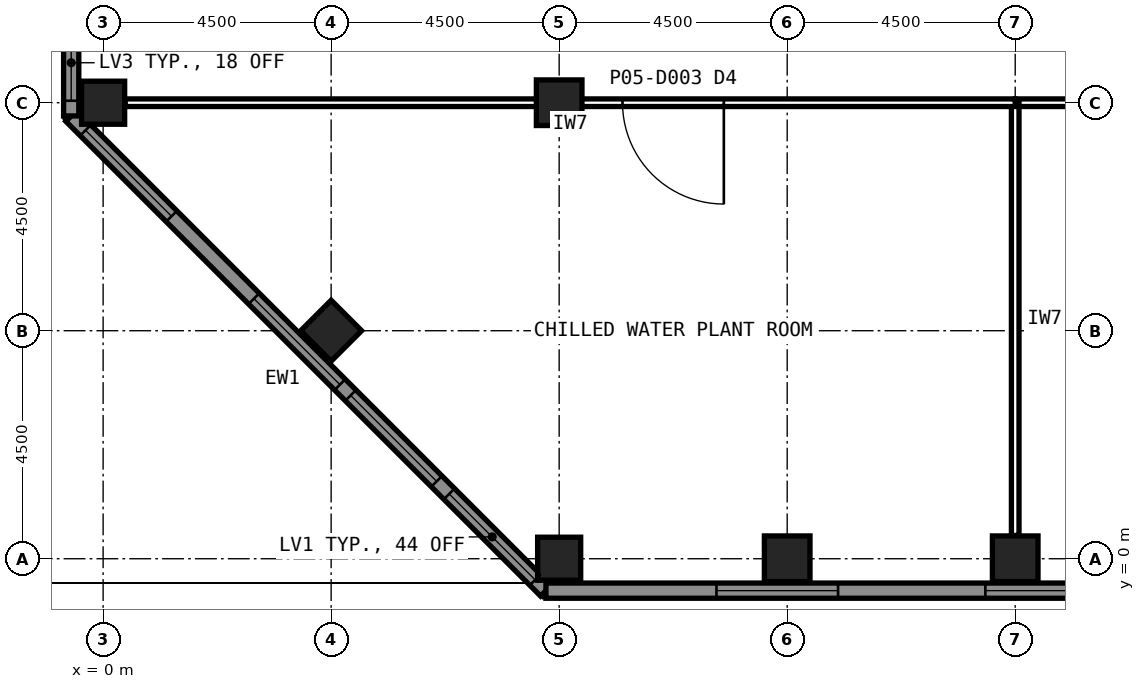
"""IFC4 building model, lengths in metres.
Left out: names, types, materials, properties, quantities, classifications, styles, units other than length and angle.
Written with IfcOpenShell. Run it as: python <this file> out.ifc"""

import sys

from ifc_helpers import new_model, si_unit, direction, frame, frame_2d, origin, origin_2d, place, context, subcontext, project, spatial, rectangle, hollow_rectangle, extrude, element, fill, save


model = new_model("IFC4")
c1 = context("Model", 3, precision=1e-05, world=origin(), true_north=direction((0.0, 1.0)))
c2 = subcontext(c1, "Body", "Model", "MODEL_VIEW")
j1 = project(units=[si_unit("LENGTHUNIT", "METRE"), si_unit("PLANEANGLEUNIT", "RADIAN")], contexts=[c1])
p1 = place(None, origin())
s1 = spatial("IfcSite", under=j1, at=p1, CompositionType="ELEMENT")
p2 = place(p1, origin())
s2 = spatial("IfcBuilding", under=s1, at=p2, CompositionType="ELEMENT")
p3 = place(p2, frame((0.0, 0.0, 23.0)))
s3 = spatial("IfcBuildingStorey", under=s2, at=p3, CompositionType="ELEMENT", Elevation=23.0)
p4 = place(p3, frame((9.0, 0.0, 0.0), z_axis=(0.0, 0.0, 1.0), x_axis=(1.0, 0.0, 0.0)))
e1 = element("IfcColumn", 1, at=p4, inside=s3, PredefinedType="COLUMN", context=c2, shape_type="SweptSolid", body=[
    extrude(hollow_rectangle(XDim=0.85, YDim=0.85, WallThickness=0.05, at=origin_2d()), origin(), (0.0, 0.0, 1.0), 6.0),
])
for number, where, z_axis, x_axis in (
    (2, (13.5, 0.0, 0.0), (0.0, 0.0, 1.0), (1.0, 0.0, 0.0)),
    (3, (18.0, 0.0, 0.0), (0.0, 0.0, 1.0), (1.0, 0.0, 0.0)),
):
    element("IfcColumn", number, at=place(p3, frame(where, z_axis=z_axis, x_axis=x_axis)), inside=s3, PredefinedType="COLUMN", context=c2, shape_type="SweptSolid", body=[
        extrude(hollow_rectangle(XDim=0.9, YDim=0.9, WallThickness=0.063, at=origin_2d()), origin(), (0.0, 0.0, 1.0), 6.0),
    ])
for number, where, z_axis, x_axis in (
    (4, (0.0, 9.0, 0.0), (0.0, 0.0, 1.0), (1.0, 0.0, 0.0)),
    (5, (4.5, 4.5, 0.0), (0.0, 0.0, 1.0), (0.707, 0.707, 0.0)),
):
    element("IfcColumn", number, at=place(p3, frame(where, z_axis=z_axis, x_axis=x_axis)), inside=s3, PredefinedType="COLUMN", context=c2, shape_type="SweptSolid", body=[
        extrude(hollow_rectangle(XDim=0.85, YDim=0.85, WallThickness=0.05, at=origin_2d()), origin(), (0.0, 0.0, 1.0), 6.0),
    ])
p5 = place(p3, frame((9.0, 9.0, 0.0), z_axis=(0.0, 0.0, 1.0), x_axis=(1.0, 0.0, 0.0)))
e6 = element("IfcColumn", 6, at=p5, inside=s3, PredefinedType="COLUMN", context=c2, shape_type="SweptSolid", body=[
    extrude(hollow_rectangle(XDim=0.9, YDim=0.9, WallThickness=0.063, at=origin_2d()), origin(), (0.0, 0.0, 1.0), 6.0),
])
p6 = place(p3, frame((8.739, -0.63, 0.0), z_axis=(0.0, 0.0, 1.0), x_axis=(-0.707106781187, 0.707106781187, 0.0)))
e7 = element("IfcWall", 7, at=p6, inside=s3, PredefinedType="SOLIDWALL", context=c2, shape_type="SweptSolid", body=[
    extrude(rectangle(XDim=13.25, YDim=0.3, at=frame_2d((6.625, 0.0))), origin(), (0.0, 0.0, 1.0), 6.0),
])
p7 = place(p6, frame((0.3, 0.0, 0.3)))
e8 = element("IfcOpeningElement", 8, at=p7, cuts=e7, PredefinedType="OPENING", context=c2, shape_type="SweptSolid", body=[
    extrude(rectangle(XDim=2.4, YDim=3.0, at=frame_2d((1.2, 1.5))), frame((0.0, 0.16, 0.0), z_axis=(0.0, -1.0, 0.0), x_axis=(1.0, 0.0, 0.0)), (0.0, 0.0, 1.0), 0.32),
])
p8 = place(p6, frame((3.05, 0.0, 2.7)))
e9 = element("IfcOpeningElement", 9, at=p8, cuts=e7, PredefinedType="OPENING", context=c2, shape_type="SweptSolid", body=[
    extrude(rectangle(XDim=2.4, YDim=3.0, at=frame_2d((1.2, 1.5))), frame((0.0, 0.16, 0.0), z_axis=(0.0, -1.0, 0.0), x_axis=(1.0, 0.0, 0.0)), (0.0, 0.0, 1.0), 0.32),
])
p9 = place(p6, frame((5.75, 0.0, 0.75)))
e10 = element("IfcOpeningElement", 10, at=p9, cuts=e7, PredefinedType="OPENING", context=c2, shape_type="SweptSolid", body=[
    extrude(rectangle(XDim=2.4, YDim=3.0, at=frame_2d((1.2, 1.5))), frame((0.0, 0.16, 0.0), z_axis=(0.0, -1.0, 0.0), x_axis=(1.0, 0.0, 0.0)), (0.0, 0.0, 1.0), 0.32),
])
p10 = place(p6, frame((10.45, 0.0, 0.3)))
e11 = element("IfcOpeningElement", 11, at=p10, cuts=e7, PredefinedType="OPENING", context=c2, shape_type="SweptSolid", body=[
    extrude(rectangle(XDim=2.4, YDim=3.0, at=frame_2d((1.2, 1.5))), frame((0.0, 0.16, 0.0), z_axis=(0.0, -1.0, 0.0), x_axis=(1.0, 0.0, 0.0)), (0.0, 0.0, 1.0), 0.32),
])
p11 = place(p3, frame((-0.63, 8.739, 0.0), z_axis=(0.0, 0.0, 1.0), x_axis=(0.0, 1.0, 0.0)))
e12 = element("IfcWall", 12, at=p11, inside=s3, PredefinedType="SOLIDWALL", context=c2, shape_type="SweptSolid", body=[
    extrude(rectangle(XDim=36.522, YDim=0.3, at=frame_2d((18.261, 0.0))), origin(), (0.0, 0.0, 1.0), 6.0),
])
p12 = place(p11, frame((16.011, 0.0, 0.0)))
e13 = element("IfcOpeningElement", 13, at=p12, cuts=e12, PredefinedType="OPENING", context=c2, shape_type="SweptSolid", body=[
    extrude(rectangle(XDim=1.0, YDim=2.1, at=frame_2d((0.5, 1.05))), frame((0.0, 0.16, 0.0), z_axis=(0.0, -1.0, 0.0), x_axis=(1.0, 0.0, 0.0)), (0.0, 0.0, 1.0), 0.32),
])
p13 = place(p11, frame((0.3, 0.0, 0.3)))
e14 = element("IfcOpeningElement", 14, at=p13, cuts=e12, PredefinedType="OPENING", context=c2, shape_type="SweptSolid", body=[
    extrude(rectangle(XDim=1.5, YDim=2.0, at=frame_2d((0.75, 1.0))), frame((0.0, 0.16, 0.0), z_axis=(0.0, -1.0, 0.0), x_axis=(1.0, 0.0, 0.0)), (0.0, 0.0, 1.0), 0.32),
])
p14 = place(p11, frame((3.365, 0.0, 1.2)))
e15 = element("IfcOpeningElement", 15, at=p14, cuts=e12, PredefinedType="OPENING", context=c2, shape_type="SweptSolid", body=[
    extrude(rectangle(XDim=2.4, YDim=3.0, at=frame_2d((1.2, 1.5))), frame((0.0, 0.16, 0.0), z_axis=(0.0, -1.0, 0.0), x_axis=(1.0, 0.0, 0.0)), (0.0, 0.0, 1.0), 0.32),
])
p15 = place(p11, frame((1.5, 0.0, 3.65)))
e16 = element("IfcOpeningElement", 16, at=p15, cuts=e12, PredefinedType="OPENING", context=c2, shape_type="SweptSolid", body=[
    extrude(rectangle(XDim=1.5, YDim=2.0, at=frame_2d((0.75, 1.0))), frame((0.0, 0.16, 0.0), z_axis=(0.0, -1.0, 0.0), x_axis=(1.0, 0.0, 0.0)), (0.0, 0.0, 1.0), 0.32),
])
p16 = place(p11, frame((6.1, 0.0, 3.6)))
e17 = element("IfcOpeningElement", 17, at=p16, cuts=e12, PredefinedType="OPENING", context=c2, shape_type="SweptSolid", body=[
    extrude(rectangle(XDim=1.5, YDim=2.0, at=frame_2d((0.75, 1.0))), frame((0.0, 0.16, 0.0), z_axis=(0.0, -1.0, 0.0), x_axis=(1.0, 0.0, 0.0)), (0.0, 0.0, 1.0), 0.32),
])
p17 = place(p11, frame((12.496, 0.0, 1.2)))
e18 = element("IfcOpeningElement", 18, at=p17, cuts=e12, PredefinedType="OPENING", context=c2, shape_type="SweptSolid", body=[
    extrude(rectangle(XDim=2.4, YDim=3.0, at=frame_2d((1.2, 1.5))), frame((0.0, 0.16, 0.0), z_axis=(0.0, -1.0, 0.0), x_axis=(1.0, 0.0, 0.0)), (0.0, 0.0, 1.0), 0.32),
])
p18 = place(p11, frame((7.45, 0.0, 0.3)))
e19 = element("IfcOpeningElement", 19, at=p18, cuts=e12, PredefinedType="OPENING", context=c2, shape_type="SweptSolid", body=[
    extrude(rectangle(XDim=2.4, YDim=3.0, at=frame_2d((1.2, 1.5))), frame((0.0, 0.16, 0.0), z_axis=(0.0, -1.0, 0.0), x_axis=(1.0, 0.0, 0.0)), (0.0, 0.0, 1.0), 0.32),
])
p19 = place(p11, frame((21.626, 0.0, 1.2)))
e20 = element("IfcOpeningElement", 20, at=p19, cuts=e12, PredefinedType="OPENING", context=c2, shape_type="SweptSolid", body=[
    extrude(rectangle(XDim=2.4, YDim=3.0, at=frame_2d((1.2, 1.5))), frame((0.0, 0.16, 0.0), z_axis=(0.0, -1.0, 0.0), x_axis=(1.0, 0.0, 0.0)), (0.0, 0.0, 1.0), 0.32),
])
p20 = place(p11, frame((10.15, 0.0, 0.3)))
e21 = element("IfcOpeningElement", 21, at=p20, cuts=e12, PredefinedType="OPENING", context=c2, shape_type="SweptSolid", body=[
    extrude(rectangle(XDim=1.5, YDim=2.0, at=frame_2d((0.75, 1.0))), frame((0.0, 0.16, 0.0), z_axis=(0.0, -1.0, 0.0), x_axis=(1.0, 0.0, 0.0)), (0.0, 0.0, 1.0), 0.32),
])
p21 = place(p11, frame((17.35, 0.0, 0.3)))
e22 = element("IfcOpeningElement", 22, at=p21, cuts=e12, PredefinedType="OPENING", context=c2, shape_type="SweptSolid", body=[
    extrude(rectangle(XDim=2.4, YDim=3.0, at=frame_2d((1.2, 1.5))), frame((0.0, 0.16, 0.0), z_axis=(0.0, -1.0, 0.0), x_axis=(1.0, 0.0, 0.0)), (0.0, 0.0, 1.0), 0.32),
])
p22 = place(p11, frame((30.757, 0.0, 1.2)))
e23 = element("IfcOpeningElement", 23, at=p22, cuts=e12, PredefinedType="OPENING", context=c2, shape_type="SweptSolid", body=[
    extrude(rectangle(XDim=2.4, YDim=3.0, at=frame_2d((1.2, 1.5))), frame((0.0, 0.16, 0.0), z_axis=(0.0, -1.0, 0.0), x_axis=(1.0, 0.0, 0.0)), (0.0, 0.0, 1.0), 0.32),
])
p23 = place(p11, frame((25.45, 0.0, 0.3)))
e24 = element("IfcOpeningElement", 24, at=p23, cuts=e12, PredefinedType="OPENING", context=c2, shape_type="SweptSolid", body=[
    extrude(rectangle(XDim=2.4, YDim=3.0, at=frame_2d((1.2, 1.5))), frame((0.0, 0.16, 0.0), z_axis=(0.0, -1.0, 0.0), x_axis=(1.0, 0.0, 0.0)), (0.0, 0.0, 1.0), 0.32),
])
p24 = place(p3, frame((45.261, -0.63, 0.0), z_axis=(0.0, 0.0, 1.0), x_axis=(-1.0, 0.0, 0.0)))
e25 = element("IfcWall", 25, at=p24, inside=s3, PredefinedType="SOLIDWALL", context=c2, shape_type="SweptSolid", body=[
    extrude(rectangle(XDim=36.522, YDim=0.3, at=frame_2d((18.261, 0.0))), origin(), (0.0, 0.0, 1.0), 6.0),
])
p25 = place(p24, frame((0.3, 0.0, 0.3)))
e26 = element("IfcOpeningElement", 26, at=p25, cuts=e25, PredefinedType="OPENING", context=c2, shape_type="SweptSolid", body=[
    extrude(rectangle(XDim=1.5, YDim=2.0, at=frame_2d((0.75, 1.0))), frame((0.0, 0.16, 0.0), z_axis=(0.0, -1.0, 0.0), x_axis=(1.0, 0.0, 0.0)), (0.0, 0.0, 1.0), 0.32),
])
p26 = place(p24, frame((3.365, 0.0, 1.2)))
e27 = element("IfcOpeningElement", 27, at=p26, cuts=e25, PredefinedType="OPENING", context=c2, shape_type="SweptSolid", body=[
    extrude(rectangle(XDim=2.4, YDim=3.0, at=frame_2d((1.2, 1.5))), frame((0.0, 0.16, 0.0), z_axis=(0.0, -1.0, 0.0), x_axis=(1.0, 0.0, 0.0)), (0.0, 0.0, 1.0), 0.32),
])
p27 = place(p24, frame((1.5, 0.0, 3.65)))
e28 = element("IfcOpeningElement", 28, at=p27, cuts=e25, PredefinedType="OPENING", context=c2, shape_type="SweptSolid", body=[
    extrude(rectangle(XDim=1.5, YDim=2.0, at=frame_2d((0.75, 1.0))), frame((0.0, 0.16, 0.0), z_axis=(0.0, -1.0, 0.0), x_axis=(1.0, 0.0, 0.0)), (0.0, 0.0, 1.0), 0.32),
])
p28 = place(p24, frame((6.1, 0.0, 3.6)))
e29 = element("IfcOpeningElement", 29, at=p28, cuts=e25, PredefinedType="OPENING", context=c2, shape_type="SweptSolid", body=[
    extrude(rectangle(XDim=1.5, YDim=2.0, at=frame_2d((0.75, 1.0))), frame((0.0, 0.16, 0.0), z_axis=(0.0, -1.0, 0.0), x_axis=(1.0, 0.0, 0.0)), (0.0, 0.0, 1.0), 0.32),
])
p29 = place(p24, frame((12.496, 0.0, 1.2)))
e30 = element("IfcOpeningElement", 30, at=p29, cuts=e25, PredefinedType="OPENING", context=c2, shape_type="SweptSolid", body=[
    extrude(rectangle(XDim=2.4, YDim=3.0, at=frame_2d((1.2, 1.5))), frame((0.0, 0.16, 0.0), z_axis=(0.0, -1.0, 0.0), x_axis=(1.0, 0.0, 0.0)), (0.0, 0.0, 1.0), 0.32),
])
p30 = place(p24, frame((7.45, 0.0, 0.3)))
e31 = element("IfcOpeningElement", 31, at=p30, cuts=e25, PredefinedType="OPENING", context=c2, shape_type="SweptSolid", body=[
    extrude(rectangle(XDim=2.4, YDim=3.0, at=frame_2d((1.2, 1.5))), frame((0.0, 0.16, 0.0), z_axis=(0.0, -1.0, 0.0), x_axis=(1.0, 0.0, 0.0)), (0.0, 0.0, 1.0), 0.32),
])
p31 = place(p24, frame((10.15, 0.0, 0.3)))
e32 = element("IfcOpeningElement", 32, at=p31, cuts=e25, PredefinedType="OPENING", context=c2, shape_type="SweptSolid", body=[
    extrude(rectangle(XDim=1.5, YDim=2.0, at=frame_2d((0.75, 1.0))), frame((0.0, 0.16, 0.0), z_axis=(0.0, -1.0, 0.0), x_axis=(1.0, 0.0, 0.0)), (0.0, 0.0, 1.0), 0.32),
])
p32 = place(p24, frame((21.626, 0.0, 1.2)))
e33 = element("IfcOpeningElement", 33, at=p32, cuts=e25, PredefinedType="OPENING", context=c2, shape_type="SweptSolid", body=[
    extrude(rectangle(XDim=2.4, YDim=3.0, at=frame_2d((1.2, 1.5))), frame((0.0, 0.16, 0.0), z_axis=(0.0, -1.0, 0.0), x_axis=(1.0, 0.0, 0.0)), (0.0, 0.0, 1.0), 0.32),
])
p33 = place(p24, frame((10.5, 0.0, 3.65)))
e34 = element("IfcOpeningElement", 34, at=p33, cuts=e25, PredefinedType="OPENING", context=c2, shape_type="SweptSolid", body=[
    extrude(rectangle(XDim=1.5, YDim=2.0, at=frame_2d((0.75, 1.0))), frame((0.0, 0.16, 0.0), z_axis=(0.0, -1.0, 0.0), x_axis=(1.0, 0.0, 0.0)), (0.0, 0.0, 1.0), 0.32),
])
p34 = place(p24, frame((16.45, 0.0, 0.3)))
e35 = element("IfcOpeningElement", 35, at=p34, cuts=e25, PredefinedType="OPENING", context=c2, shape_type="SweptSolid", body=[
    extrude(rectangle(XDim=2.4, YDim=3.0, at=frame_2d((1.2, 1.5))), frame((0.0, 0.16, 0.0), z_axis=(0.0, -1.0, 0.0), x_axis=(1.0, 0.0, 0.0)), (0.0, 0.0, 1.0), 0.32),
])
p35 = place(p24, frame((30.757, 0.0, 1.2)))
e36 = element("IfcOpeningElement", 36, at=p35, cuts=e25, PredefinedType="OPENING", context=c2, shape_type="SweptSolid", body=[
    extrude(rectangle(XDim=2.4, YDim=3.0, at=frame_2d((1.2, 1.5))), frame((0.0, 0.16, 0.0), z_axis=(0.0, -1.0, 0.0), x_axis=(1.0, 0.0, 0.0)), (0.0, 0.0, 1.0), 0.32),
])
p36 = place(p24, frame((25.45, 0.0, 0.3)))
e37 = element("IfcOpeningElement", 37, at=p36, cuts=e25, PredefinedType="OPENING", context=c2, shape_type="SweptSolid", body=[
    extrude(rectangle(XDim=2.4, YDim=3.0, at=frame_2d((1.2, 1.5))), frame((0.0, 0.16, 0.0), z_axis=(0.0, -1.0, 0.0), x_axis=(1.0, 0.0, 0.0)), (0.0, 0.0, 1.0), 0.32),
])
p37 = place(p3, frame((36.0, 9.0, 0.0), z_axis=(0.0, 0.0, 1.0), x_axis=(-1.0, 0.0, 0.0)))
e38 = element("IfcWall", 38, at=p37, inside=s3, PredefinedType="PARTITIONING", context=c2, shape_type="SweptSolid", body=[
    extrude(rectangle(XDim=18.0, YDim=0.15, at=frame_2d((9.0, 0.0))), origin(), (0.0, 0.0, 1.0), 5.84),
])
p38 = place(p37, frame((8.0, 0.0, 0.0)))
e39 = element("IfcOpeningElement", 39, at=p38, cuts=e38, PredefinedType="OPENING", context=c2, shape_type="SweptSolid", body=[
    extrude(rectangle(XDim=2.0, YDim=2.4, at=frame_2d((1.0, 1.2))), frame((0.0, 0.085, 0.0), z_axis=(0.0, -1.0, 0.0), x_axis=(1.0, 0.0, 0.0)), (0.0, 0.0, 1.0), 0.17),
])
p39 = place(p3, frame((18.0, 9.0, 0.0), z_axis=(0.0, 0.0, 1.0), x_axis=(0.0, -1.0, 0.0)))
e40 = element("IfcWall", 40, at=p39, inside=s3, PredefinedType="PARTITIONING", context=c2, shape_type="SweptSolid", body=[
    extrude(rectangle(XDim=8.54, YDim=0.15, at=frame_2d((4.27, 0.0))), origin(), (0.0, 0.0, 1.0), 4.989),
])
p40 = place(p3, frame((18.0, 9.0, 0.0), z_axis=(0.0, 0.0, 1.0), x_axis=(-1.0, 0.0, 0.0)))
e41 = element("IfcWall", 41, at=p40, inside=s3, PredefinedType="PARTITIONING", context=c2, shape_type="SweptSolid", body=[
    extrude(rectangle(XDim=17.565, YDim=0.15, at=frame_2d((8.782, 0.0))), origin(), (0.0, 0.0, 1.0), 5.229),
])
p41 = place(p40, frame((5.75, 0.0, 0.0)))
e42 = element("IfcOpeningElement", 42, at=p41, cuts=e41, PredefinedType="OPENING", context=c2, shape_type="SweptSolid", body=[
    extrude(rectangle(XDim=2.0, YDim=2.4, at=frame_2d((1.0, 1.2))), frame((0.0, 0.085, 0.0), z_axis=(0.0, -1.0, 0.0), x_axis=(1.0, 0.0, 0.0)), (0.0, 0.0, 1.0), 0.17),
])
p42 = place(p7, origin())
e43 = element("IfcWindow", 43, at=p42, inside=s3, PartitioningType="SINGLE_PANEL", PredefinedType="USERDEFINED", context=c2, shape_type="SweptSolid", body=[
    extrude(rectangle(XDim=2.4, YDim=3.0, at=frame_2d((1.2, 1.5))), frame((0.0, 0.03, 0.0), z_axis=(0.0, -1.0, 0.0), x_axis=(1.0, 0.0, 0.0)), (0.0, 0.0, 1.0), 0.06),
])
fill(e8, e43)
p43 = place(p8, origin())
e44 = element("IfcWindow", 44, at=p43, inside=s3, PartitioningType="SINGLE_PANEL", PredefinedType="USERDEFINED", context=c2, shape_type="SweptSolid", body=[
    extrude(rectangle(XDim=2.4, YDim=3.0, at=frame_2d((1.2, 1.5))), frame((0.0, 0.03, 0.0), z_axis=(0.0, -1.0, 0.0), x_axis=(1.0, 0.0, 0.0)), (0.0, 0.0, 1.0), 0.06),
])
fill(e9, e44)
p44 = place(p9, origin())
e45 = element("IfcWindow", 45, at=p44, inside=s3, PartitioningType="SINGLE_PANEL", PredefinedType="USERDEFINED", context=c2, shape_type="SweptSolid", body=[
    extrude(rectangle(XDim=2.4, YDim=3.0, at=frame_2d((1.2, 1.5))), frame((0.0, 0.03, 0.0), z_axis=(0.0, -1.0, 0.0), x_axis=(1.0, 0.0, 0.0)), (0.0, 0.0, 1.0), 0.06),
])
fill(e10, e45)
p45 = place(p10, origin())
e46 = element("IfcWindow", 46, at=p45, inside=s3, PartitioningType="SINGLE_PANEL", PredefinedType="USERDEFINED", context=c2, shape_type="SweptSolid", body=[
    extrude(rectangle(XDim=2.4, YDim=3.0, at=frame_2d((1.2, 1.5))), frame((0.0, 0.03, 0.0), z_axis=(0.0, -1.0, 0.0), x_axis=(1.0, 0.0, 0.0)), (0.0, 0.0, 1.0), 0.06),
])
fill(e11, e46)
p46 = place(p13, origin())
e47 = element("IfcWindow", 47, at=p46, inside=s3, PartitioningType="SINGLE_PANEL", PredefinedType="USERDEFINED", context=c2, shape_type="SweptSolid", body=[
    extrude(rectangle(XDim=1.5, YDim=2.0, at=frame_2d((0.75, 1.0))), frame((0.0, 0.03, 0.0), z_axis=(0.0, -1.0, 0.0), x_axis=(1.0, 0.0, 0.0)), (0.0, 0.0, 1.0), 0.06),
])
fill(e14, e47)
p47 = place(p35, origin())
e48 = element("IfcWindow", 48, at=p47, inside=s3, PartitioningType="SINGLE_PANEL", PredefinedType="USERDEFINED", context=c2, shape_type="SweptSolid", body=[
    extrude(rectangle(XDim=2.4, YDim=3.0, at=frame_2d((1.2, 1.5))), frame((0.0, 0.03, 0.0), z_axis=(0.0, -1.0, 0.0), x_axis=(1.0, 0.0, 0.0)), (0.0, 0.0, 1.0), 0.06),
])
fill(e36, e48)
p48 = place(p36, origin())
e49 = element("IfcWindow", 49, at=p48, inside=s3, PartitioningType="SINGLE_PANEL", PredefinedType="USERDEFINED", context=c2, shape_type="SweptSolid", body=[
    extrude(rectangle(XDim=2.4, YDim=3.0, at=frame_2d((1.2, 1.5))), frame((0.0, 0.03, 0.0), z_axis=(0.0, -1.0, 0.0), x_axis=(1.0, 0.0, 0.0)), (0.0, 0.0, 1.0), 0.06),
])
fill(e37, e49)
p49 = place(p41, origin())
e50 = element("IfcDoor", 50, at=p49, inside=s3, OperationType="SINGLE_SWING_LEFT", PredefinedType="DOOR", context=c2, shape_type="SweptSolid", body=[
    extrude(rectangle(XDim=2.0, YDim=2.4, at=frame_2d((1.0, 1.2))), frame((0.0, 0.025, 0.0), z_axis=(0.0, -1.0, 0.0), x_axis=(1.0, 0.0, 0.0)), (0.0, 0.0, 1.0), 0.05),
])
fill(e42, e50)
save(model, sys.argv[1])
